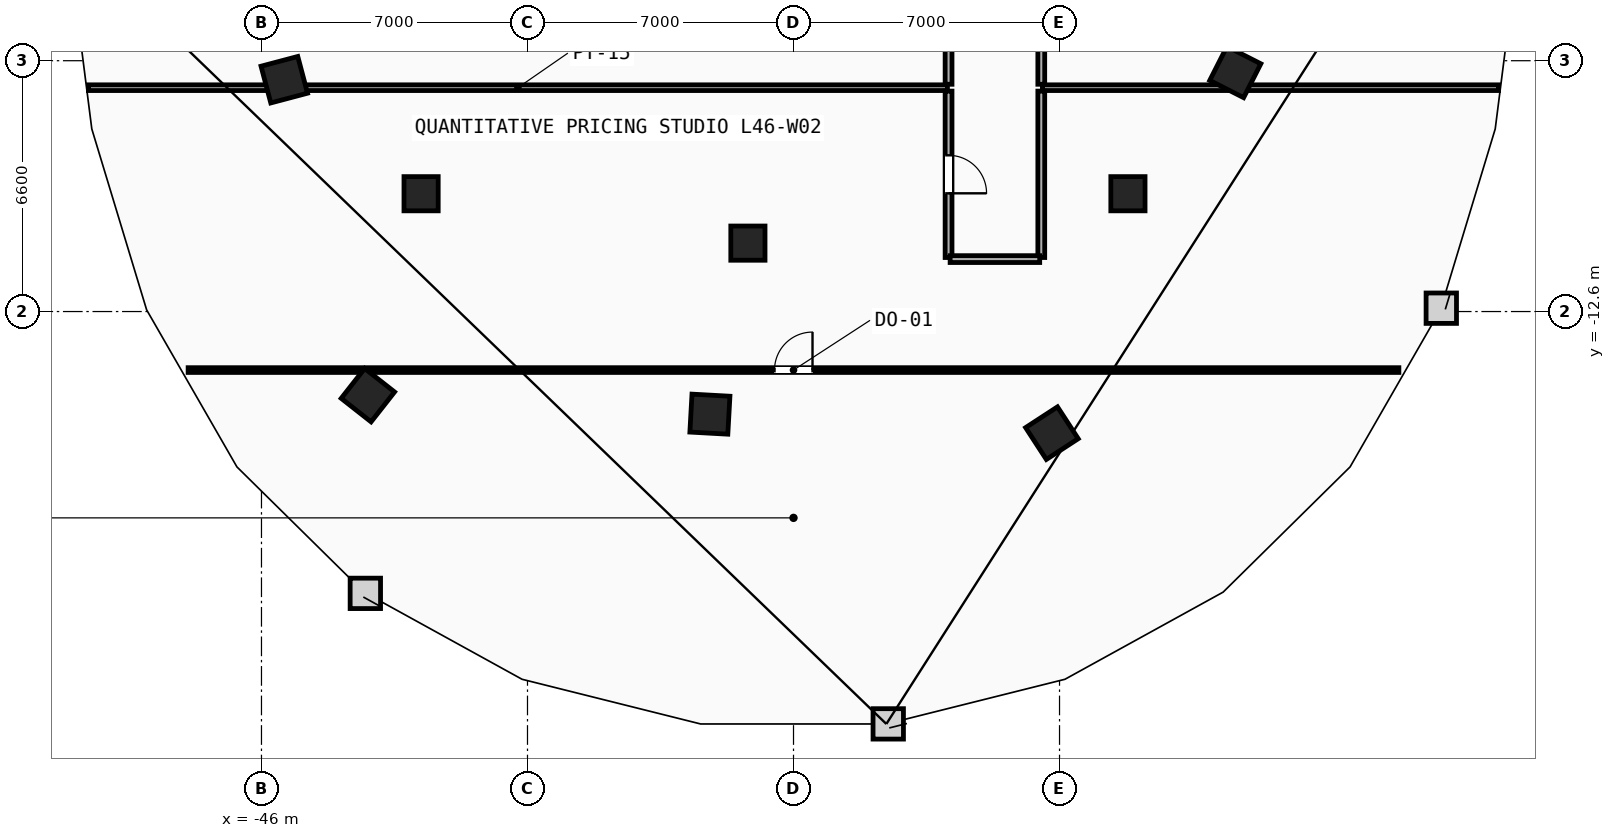
"""IFC4 building model, lengths in metres.
Left out: names, types, materials, properties, quantities, classifications, styles, units other than length and angle.
Written with IfcOpenShell. Run it as: python <this file> out.ifc"""

import sys

from ifc_helpers import new_model, si_unit, direction, frame, frame_2d, origin, origin_2d, place, context, subcontext, project, spatial, rectangle, extrude, element, fill, save


model = new_model("IFC4")
c1 = context("Model", 3, precision=1e-05, world=origin(), true_north=direction((0.0, 1.0)))
c2 = subcontext(c1, "Body", "Model", "MODEL_VIEW")
j1 = project(units=[si_unit("LENGTHUNIT", "METRE"), si_unit("PLANEANGLEUNIT", "RADIAN")], contexts=[c1])
p1 = place(None, origin())
s1 = spatial("IfcSite", under=j1, at=p1, CompositionType="ELEMENT")
p2 = place(p1, origin())
s2 = spatial("IfcBuilding", under=s1, at=p2, CompositionType="ELEMENT")
p3 = place(p2, frame((0.0, 0.0, 176.4)))
s3 = spatial("IfcBuildingStorey", under=s2, at=p3, CompositionType="ELEMENT", Elevation=176.4)
for number, where, z_axis, x_axis in (
    (1, (-41.8, -9.5, 0.0), (0.0, 0.0, 1.0), (1.0, 0.0, 0.0)),
    (2, (-33.2, -10.8, 0.0), (0.0, 0.0, 1.0), (1.0, 0.0, 0.0)),
    (3, (-23.2, -9.5, 0.0), (0.0, 0.0, 1.0), (1.0, 0.0, 0.0)),
):
    element("IfcColumn", number, at=place(p3, frame(where, z_axis=z_axis, x_axis=x_axis)), inside=s3, PredefinedType="COLUMN", context=c2, shape_type="SweptSolid", body=[
        extrude(rectangle(XDim=0.9, YDim=0.9, at=origin_2d()), origin(), (0.0, 0.0, 1.0), 3.6),
    ])
for number, where, z_axis, x_axis in (
    (4, (-45.4, -6.5, 0.0), (0.0, 0.0, 1.0), (0.256, -0.967, 0.0)),
    (5, (-43.2, -14.8, 0.0), (0.0, 0.0, 1.0), (0.786, -0.618, 0.0)),
    (6, (-34.2, -15.3, 0.0), (0.0, 0.0, 1.0), (0.998, -0.055, 0.0)),
    (7, (-25.2, -15.8, 0.0), (0.0, 0.0, 1.0), (0.838, 0.546, 0.0)),
    (8, (-20.375, -6.3, 0.0), (0.0, 0.0, 1.0), (0.453, 0.892, 0.0)),
):
    element("IfcColumn", number, at=place(p3, frame(where, z_axis=z_axis, x_axis=x_axis)), inside=s3, PredefinedType="COLUMN", context=c2, shape_type="SweptSolid", body=[
        extrude(rectangle(XDim=1.0, YDim=1.0, at=origin_2d()), origin(), (0.0, 0.0, 1.0), 3.6),
    ])
p4 = place(p3, frame((-50.553, -6.71, 0.0), z_axis=(0.0, 0.0, 1.0), x_axis=(1.0, 0.0, 0.0)))
e9 = element("IfcWall", 9, at=p4, inside=s3, PredefinedType="PARTITIONING", context=c2, shape_type="SweptSolid", body=[
    extrude(rectangle(XDim=22.603, YDim=0.15, at=frame_2d((11.302, 0.0))), origin(), (0.0, 0.0, 1.0), 3.36),
])
p5 = place(p3, frame((-25.45, -6.71, 0.0), z_axis=(0.0, 0.0, 1.0), x_axis=(1.0, 0.0, 0.0)))
e10 = element("IfcWall", 10, at=p5, inside=s3, PredefinedType="PARTITIONING", context=c2, shape_type="SweptSolid", body=[
    extrude(rectangle(XDim=12.003, YDim=0.15, at=frame_2d((6.001, 0.0))), origin(), (0.0, 0.0, 1.0), 3.36),
])
p6 = place(p3, frame((-27.92, -6.8, 0.0), z_axis=(0.0, 0.0, 1.0), x_axis=(0.0, -1.0, 0.0)))
e11 = element("IfcWall", 11, at=p6, inside=s3, PredefinedType="PARTITIONING", context=c2, shape_type="SweptSolid", body=[
    extrude(rectangle(XDim=4.378, YDim=0.18, at=frame_2d((2.189, 0.0))), origin(), (0.0, 0.0, 1.0), 3.36),
])
p7 = place(p6, frame((1.689, 0.0, 0.0)))
e12 = element("IfcOpeningElement", 12, at=p7, cuts=e11, PredefinedType="OPENING", context=c2, shape_type="SweptSolid", body=[
    extrude(rectangle(XDim=1.0, YDim=2.15, at=frame_2d((0.5, 1.075))), frame((0.0, 0.1, 0.0), z_axis=(0.0, -1.0, 0.0), x_axis=(1.0, 0.0, 0.0)), (0.0, 0.0, 1.0), 0.2),
])
p8 = place(p3, frame((-25.48, -11.178, 0.0), z_axis=(0.0, 0.0, 1.0), x_axis=(0.0, 1.0, 0.0)))
e13 = element("IfcWall", 13, at=p8, inside=s3, PredefinedType="PARTITIONING", context=c2, shape_type="SweptSolid", body=[
    extrude(rectangle(XDim=4.378, YDim=0.18, at=frame_2d((2.189, 0.0))), origin(), (0.0, 0.0, 1.0), 3.36),
])
p9 = place(p3, frame((-27.878, -11.22, 0.0), z_axis=(0.0, 0.0, 1.0), x_axis=(1.0, 0.0, 0.0)))
e14 = element("IfcWall", 14, at=p9, inside=s3, PredefinedType="PARTITIONING", context=c2, shape_type="SweptSolid", body=[
    extrude(rectangle(XDim=2.357, YDim=0.18, at=frame_2d((1.178, 0.0))), origin(), (0.0, 0.0, 1.0), 3.36),
])
p10 = place(p3, frame((-27.92, -0.45, 0.0), z_axis=(0.0, 0.0, 1.0), x_axis=(0.0, -1.0, 0.0)))
e15 = element("IfcWall", 15, at=p10, inside=s3, PredefinedType="PARTITIONING", context=c2, shape_type="SweptSolid", body=[
    extrude(rectangle(XDim=6.17, YDim=0.18, at=frame_2d((3.085, 0.0))), origin(), (0.0, 0.0, 1.0), 3.36),
])
p11 = place(p10, frame((2.585, 0.0, 0.0)))
e16 = element("IfcOpeningElement", 16, at=p11, cuts=e15, PredefinedType="OPENING", context=c2, shape_type="SweptSolid", body=[
    extrude(rectangle(XDim=1.0, YDim=2.15, at=frame_2d((0.5, 1.075))), frame((0.0, 0.1, 0.0), z_axis=(0.0, -1.0, 0.0), x_axis=(1.0, 0.0, 0.0)), (0.0, 0.0, 1.0), 0.2),
])
p12 = place(p3, frame((-25.48, -6.62, 0.0), z_axis=(0.0, 0.0, 1.0), x_axis=(0.0, 1.0, 0.0)))
e17 = element("IfcWall", 17, at=p12, inside=s3, PredefinedType="PARTITIONING", context=c2, shape_type="SweptSolid", body=[
    extrude(rectangle(XDim=6.17, YDim=0.18, at=frame_2d((3.085, 0.0))), origin(), (0.0, 0.0, 1.0), 3.36),
])
p13 = place(p3, frame((-47.93, -14.14, 0.0), z_axis=(0.0, 0.0, 1.0), x_axis=(1.0, 0.0, 0.0)))
e18 = element("IfcWall", 18, at=p13, inside=s3, PredefinedType="PARTITIONING", context=c2, shape_type="SweptSolid", body=[
    extrude(rectangle(XDim=31.86, YDim=0.125, at=frame_2d((15.93, 0.0))), origin(), (0.0, 0.0, 1.0), 3.36),
])
p14 = place(p13, frame((15.43, 0.0, 0.0)))
e19 = element("IfcOpeningElement", 19, at=p14, cuts=e18, PredefinedType="OPENING", context=c2, shape_type="SweptSolid", body=[
    extrude(rectangle(XDim=1.0, YDim=2.15, at=frame_2d((0.5, 1.075))), frame((0.0, 0.073, 0.0), z_axis=(0.0, -1.0, 0.0), x_axis=(1.0, 0.0, 0.0)), (0.0, 0.0, 1.0), 0.145),
])
p15 = place(p14, origin())
e20 = element("IfcDoor", 20, at=p15, inside=s3, OperationType="SINGLE_SWING_RIGHT", PredefinedType="DOOR", context=c2, shape_type="SweptSolid", body=[
    extrude(rectangle(XDim=1.0, YDim=2.15, at=frame_2d((0.5, 1.075))), frame((0.0, 0.025, 0.0), z_axis=(0.0, -1.0, 0.0), x_axis=(1.0, 0.0, 0.0)), (0.0, 0.0, 1.0), 0.05),
])
fill(e19, e20)
p16 = place(p7, origin())
e21 = element("IfcDoor", 21, at=p16, inside=s3, OperationType="SINGLE_SWING_RIGHT", PredefinedType="DOOR", context=c2, shape_type="SweptSolid", body=[
    extrude(rectangle(XDim=1.0, YDim=2.15, at=frame_2d((0.5, 1.075))), frame((0.0, 0.025, 0.0), z_axis=(0.0, -1.0, 0.0), x_axis=(1.0, 0.0, 0.0)), (0.0, 0.0, 1.0), 0.05),
])
fill(e12, e21)
save(model, sys.argv[1])
